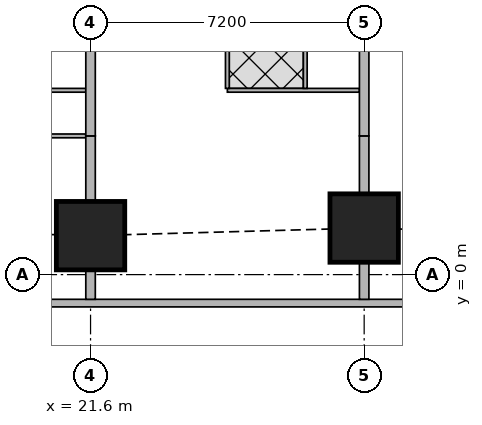
"""IFC4 building model, lengths in metres.
Left out: names, types, materials, properties, quantities, classifications, styles, units other than length and angle.
Written with IfcOpenShell. Run it as: python <this file> out.ifc"""

import sys

from ifc_helpers import new_model, si_unit, direction, frame, frame_2d, origin, origin_2d, place, context, subcontext, project, spatial, rectangle, extrude, element, fill, save


model = new_model("IFC4")
c1 = context("Model", 3, precision=1e-05, world=origin(), true_north=direction((0.0, 1.0)))
c2 = subcontext(c1, "Body", "Model", "MODEL_VIEW")
j1 = project(units=[si_unit("LENGTHUNIT", "METRE"), si_unit("PLANEANGLEUNIT", "RADIAN")], contexts=[c1])
p1 = place(None, origin())
s1 = spatial("IfcSite", under=j1, at=p1, CompositionType="ELEMENT")
p2 = place(p1, origin())
s2 = spatial("IfcBuilding", under=s1, at=p2, CompositionType="ELEMENT")
p3 = place(p2, frame((0.0, 0.0, 180.8)))
s3 = spatial("IfcBuildingStorey", under=s2, at=p3, CompositionType="ELEMENT", Elevation=180.8)
for number, where, z_axis, x_axis in (
    (1, (21.6, 1.025, 0.0), (0.0, 0.0, 1.0), (1.0, 0.0, 0.0)),
    (2, (28.8, 1.225, 0.0), (0.0, 0.0, 1.0), (1.0, 0.0, 0.0)),
):
    element("IfcColumn", number, at=place(p3, frame(where, z_axis=z_axis, x_axis=x_axis)), inside=s3, PredefinedType="COLUMN", context=c2, shape_type="SweptSolid", body=[
        extrude(rectangle(XDim=1.8, YDim=1.8, at=origin_2d()), origin(), (0.0, 0.0, 1.0), 3.75),
    ])
p4 = place(p3, frame((2.163, -0.75, 0.0), z_axis=(0.0, 0.0, 1.0), x_axis=(1.0, 0.0, 0.0)))
e3 = element("IfcWall", 3, at=p4, inside=s3, PredefinedType="SOLIDWALL", context=c2, shape_type="SweptSolid", body=[
    extrude(rectangle(XDim=45.628, YDim=0.2, at=frame_2d((22.814, 0.0))), origin(), (0.0, 0.0, 1.0), 3.5),
])
p5 = place(p4, frame((9.537, 0.0, 0.9)))
e4 = element("IfcOpeningElement", 4, at=p5, cuts=e3, PredefinedType="OPENING", context=c2, shape_type="SweptSolid", body=[
    extrude(rectangle(XDim=1.8, YDim=1.5, at=frame_2d((0.9, 0.75))), frame((0.0, 0.11, 0.0), z_axis=(0.0, -1.0, 0.0), x_axis=(1.0, 0.0, 0.0)), (0.0, 0.0, 1.0), 0.22),
])
p6 = place(p4, frame((13.137, 0.0, 0.9)))
e5 = element("IfcOpeningElement", 5, at=p6, cuts=e3, PredefinedType="OPENING", context=c2, shape_type="SweptSolid", body=[
    extrude(rectangle(XDim=1.8, YDim=1.5, at=frame_2d((0.9, 0.75))), frame((0.0, 0.11, 0.0), z_axis=(0.0, -1.0, 0.0), x_axis=(1.0, 0.0, 0.0)), (0.0, 0.0, 1.0), 0.22),
])
p7 = place(p4, frame((16.737, 0.0, 0.9)))
e6 = element("IfcOpeningElement", 6, at=p7, cuts=e3, PredefinedType="OPENING", context=c2, shape_type="SweptSolid", body=[
    extrude(rectangle(XDim=1.8, YDim=1.5, at=frame_2d((0.9, 0.75))), frame((0.0, 0.11, 0.0), z_axis=(0.0, -1.0, 0.0), x_axis=(1.0, 0.0, 0.0)), (0.0, 0.0, 1.0), 0.22),
])
p8 = place(p4, frame((20.337, 0.0, 0.9)))
e7 = element("IfcOpeningElement", 7, at=p8, cuts=e3, PredefinedType="OPENING", context=c2, shape_type="SweptSolid", body=[
    extrude(rectangle(XDim=1.8, YDim=1.5, at=frame_2d((0.9, 0.75))), frame((0.0, 0.11, 0.0), z_axis=(0.0, -1.0, 0.0), x_axis=(1.0, 0.0, 0.0)), (0.0, 0.0, 1.0), 0.22),
])
p9 = place(p4, frame((23.937, 0.0, 0.9)))
e8 = element("IfcOpeningElement", 8, at=p9, cuts=e3, PredefinedType="OPENING", context=c2, shape_type="SweptSolid", body=[
    extrude(rectangle(XDim=1.8, YDim=1.5, at=frame_2d((0.9, 0.75))), frame((0.0, 0.11, 0.0), z_axis=(0.0, -1.0, 0.0), x_axis=(1.0, 0.0, 0.0)), (0.0, 0.0, 1.0), 0.22),
])
p10 = place(p4, frame((27.537, 0.0, 0.9)))
e9 = element("IfcOpeningElement", 9, at=p10, cuts=e3, PredefinedType="OPENING", context=c2, shape_type="SweptSolid", body=[
    extrude(rectangle(XDim=1.8, YDim=1.5, at=frame_2d((0.9, 0.75))), frame((0.0, 0.11, 0.0), z_axis=(0.0, -1.0, 0.0), x_axis=(1.0, 0.0, 0.0)), (0.0, 0.0, 1.0), 0.22),
])
p11 = place(p4, frame((31.137, 0.0, 0.9)))
e10 = element("IfcOpeningElement", 10, at=p11, cuts=e3, PredefinedType="OPENING", context=c2, shape_type="SweptSolid", body=[
    extrude(rectangle(XDim=1.8, YDim=1.5, at=frame_2d((0.9, 0.75))), frame((0.0, 0.11, 0.0), z_axis=(0.0, -1.0, 0.0), x_axis=(1.0, 0.0, 0.0)), (0.0, 0.0, 1.0), 0.22),
])
p12 = place(p4, frame((34.737, 0.0, 0.9)))
e11 = element("IfcOpeningElement", 11, at=p12, cuts=e3, PredefinedType="OPENING", context=c2, shape_type="SweptSolid", body=[
    extrude(rectangle(XDim=1.8, YDim=1.5, at=frame_2d((0.9, 0.75))), frame((0.0, 0.11, 0.0), z_axis=(0.0, -1.0, 0.0), x_axis=(1.0, 0.0, 0.0)), (0.0, 0.0, 1.0), 0.22),
])
p13 = place(p3, frame((21.475, 3.65, 0.0), z_axis=(0.0, 0.0, 1.0), x_axis=(-1.0, 0.0, 0.0)))
e12 = element("IfcWall", 12, at=p13, inside=s3, PredefinedType="PARTITIONING", context=c2, shape_type="SweptSolid", body=[
    extrude(rectangle(XDim=7.075, YDim=0.1, at=frame_2d((3.538, 0.0))), origin(), (0.0, 0.0, 1.0), 3.5),
])
p14 = place(p13, frame((5.975, 0.0, 0.0)))
e13 = element("IfcOpeningElement", 13, at=p14, cuts=e12, PredefinedType="OPENING", context=c2, shape_type="SweptSolid", body=[
    extrude(rectangle(XDim=0.9, YDim=2.1, at=frame_2d((0.45, 1.05))), frame((0.0, 0.06, 0.0), z_axis=(0.0, -1.0, 0.0), x_axis=(1.0, 0.0, 0.0)), (0.0, 0.0, 1.0), 0.12),
])
p15 = place(p13, frame((2.375, 0.0, 0.0)))
e14 = element("IfcOpeningElement", 14, at=p15, cuts=e12, PredefinedType="OPENING", context=c2, shape_type="SweptSolid", body=[
    extrude(rectangle(XDim=0.9, YDim=2.1, at=frame_2d((0.45, 1.05))), frame((0.0, 0.06, 0.0), z_axis=(0.0, -1.0, 0.0), x_axis=(1.0, 0.0, 0.0)), (0.0, 0.0, 1.0), 0.12),
])
p16 = place(p3, frame((21.475, 4.85, 0.0), z_axis=(0.0, 0.0, 1.0), x_axis=(-1.0, 0.0, 0.0)))
e15 = element("IfcWall", 15, at=p16, inside=s3, PredefinedType="PARTITIONING", context=c2, shape_type="SweptSolid", body=[
    extrude(rectangle(XDim=7.075, YDim=0.1, at=frame_2d((3.538, 0.0))), origin(), (0.0, 0.0, 1.0), 3.5),
])
p17 = place(p16, frame((5.6, 0.0, 0.0)))
e16 = element("IfcOpeningElement", 16, at=p17, cuts=e15, PredefinedType="OPENING", context=c2, shape_type="SweptSolid", body=[
    extrude(rectangle(XDim=0.9, YDim=2.1, at=frame_2d((0.45, 1.05))), frame((0.0, 0.06, 0.0), z_axis=(0.0, -1.0, 0.0), x_axis=(1.0, 0.0, 0.0)), (0.0, 0.0, 1.0), 0.12),
])
p18 = place(p16, frame((2.225, 0.0, 0.0)))
e17 = element("IfcOpeningElement", 17, at=p18, cuts=e15, PredefinedType="OPENING", context=c2, shape_type="SweptSolid", body=[
    extrude(rectangle(XDim=0.9, YDim=2.1, at=frame_2d((0.45, 1.05))), frame((0.0, 0.06, 0.0), z_axis=(0.0, -1.0, 0.0), x_axis=(1.0, 0.0, 0.0)), (0.0, 0.0, 1.0), 0.12),
])
p19 = place(p16, frame((3.8, 0.0, 0.0)))
e18 = element("IfcOpeningElement", 18, at=p19, cuts=e15, PredefinedType="OPENING", context=c2, shape_type="SweptSolid", body=[
    extrude(rectangle(XDim=0.9, YDim=2.1, at=frame_2d((0.45, 1.05))), frame((0.0, 0.06, 0.0), z_axis=(0.0, -1.0, 0.0), x_axis=(1.0, 0.0, 0.0)), (0.0, 0.0, 1.0), 0.12),
])
p20 = place(p16, frame((0.425, 0.0, 0.0)))
e19 = element("IfcOpeningElement", 19, at=p20, cuts=e15, PredefinedType="OPENING", context=c2, shape_type="SweptSolid", body=[
    extrude(rectangle(XDim=0.9, YDim=2.1, at=frame_2d((0.45, 1.05))), frame((0.0, 0.06, 0.0), z_axis=(0.0, -1.0, 0.0), x_axis=(1.0, 0.0, 0.0)), (0.0, 0.0, 1.0), 0.12),
])
p21 = place(p3, frame((28.675, 4.85, 0.0), z_axis=(0.0, 0.0, 1.0), x_axis=(-1.0, 0.0, 0.0)))
e20 = element("IfcWall", 20, at=p21, inside=s3, PredefinedType="PARTITIONING", context=c2, shape_type="SweptSolid", body=[
    extrude(rectangle(XDim=3.475, YDim=0.1, at=frame_2d((1.738, 0.0))), origin(), (0.0, 0.0, 1.0), 3.5),
])
p22 = place(p21, frame((2.0, 0.0, 0.0)))
e21 = element("IfcOpeningElement", 21, at=p22, cuts=e20, PredefinedType="OPENING", context=c2, shape_type="SweptSolid", body=[
    extrude(rectangle(XDim=0.9, YDim=2.1, at=frame_2d((0.45, 1.05))), frame((0.0, 0.06, 0.0), z_axis=(0.0, -1.0, 0.0), x_axis=(1.0, 0.0, 0.0)), (0.0, 0.0, 1.0), 0.12),
])
p23 = place(p21, frame((0.2, 0.0, 0.0)))
e22 = element("IfcOpeningElement", 22, at=p23, cuts=e20, PredefinedType="OPENING", context=c2, shape_type="SweptSolid", body=[
    extrude(rectangle(XDim=0.9, YDim=2.1, at=frame_2d((0.45, 1.05))), frame((0.0, 0.06, 0.0), z_axis=(0.0, -1.0, 0.0), x_axis=(1.0, 0.0, 0.0)), (0.0, 0.0, 1.0), 0.12),
])
for number, where, z_axis, x_axis in (
    (23, (25.2, 4.9, 0.0), (0.0, 0.0, 1.0), (0.0, 1.0, 0.0)),
    (24, (27.25, 4.9, 0.0), (0.0, 0.0, 1.0), (0.0, 1.0, 0.0)),
):
    element("IfcWall", number, at=place(p3, frame(where, z_axis=z_axis, x_axis=x_axis)), inside=s3, PredefinedType="PARTITIONING", context=c2, shape_type="SweptSolid", body=[
        extrude(rectangle(XDim=3.525, YDim=0.1, at=frame_2d((1.763, 0.0))), origin(), (0.0, 0.0, 1.0), 3.5),
    ])
p24 = place(p3, frame((21.6, -0.65, 0.0), z_axis=(0.0, 0.0, 1.0), x_axis=(0.0, 1.0, 0.0)))
e25 = element("IfcWall", 25, at=p24, inside=s3, PredefinedType="SOLIDWALL", context=c2, shape_type="SweptSolid", body=[
    extrude(rectangle(XDim=0.774, YDim=0.25, at=frame_2d((0.387, 0.0))), origin(), (0.0, 0.0, 1.0), 2.1),
])
p25 = place(p3, frame((21.6, 1.926, 0.0), z_axis=(0.0, 0.0, 1.0), x_axis=(0.0, 1.0, 0.0)))
e26 = element("IfcWall", 26, at=p25, inside=s3, PredefinedType="SOLIDWALL", context=c2, shape_type="SweptSolid", body=[
    extrude(rectangle(XDim=1.724, YDim=0.25, at=frame_2d((0.862, 0.0))), origin(), (0.0, 0.0, 1.0), 2.1),
])
p26 = place(p3, frame((21.6, 3.65, 0.0), z_axis=(0.0, 0.0, 1.0), x_axis=(0.0, 1.0, 0.0)))
e27 = element("IfcWall", 27, at=p26, inside=s3, PredefinedType="SOLIDWALL", context=c2, shape_type="SweptSolid", body=[
    extrude(rectangle(XDim=3.099, YDim=0.25, at=frame_2d((1.55, 0.0))), origin(), (0.0, 0.0, 1.0), 3.5),
])
p27 = place(p3, frame((28.8, -0.65, 0.0), z_axis=(0.0, 0.0, 1.0), x_axis=(0.0, 1.0, 0.0)))
e28 = element("IfcWall", 28, at=p27, inside=s3, PredefinedType="SOLIDWALL", context=c2, shape_type="SweptSolid", body=[
    extrude(rectangle(XDim=0.974, YDim=0.25, at=frame_2d((0.487, 0.0))), origin(), (0.0, 0.0, 1.0), 2.1),
])
p28 = place(p3, frame((28.8, 2.126, 0.0), z_axis=(0.0, 0.0, 1.0), x_axis=(0.0, 1.0, 0.0)))
e29 = element("IfcWall", 29, at=p28, inside=s3, PredefinedType="SOLIDWALL", context=c2, shape_type="SweptSolid", body=[
    extrude(rectangle(XDim=1.524, YDim=0.25, at=frame_2d((0.762, 0.0))), origin(), (0.0, 0.0, 1.0), 2.1),
])
p29 = place(p3, frame((28.8, 3.65, 0.0), z_axis=(0.0, 0.0, 1.0), x_axis=(0.0, 1.0, 0.0)))
e30 = element("IfcWall", 30, at=p29, inside=s3, PredefinedType="SOLIDWALL", context=c2, shape_type="SweptSolid", body=[
    extrude(rectangle(XDim=3.099, YDim=0.25, at=frame_2d((1.55, 0.0))), origin(), (0.0, 0.0, 1.0), 3.5),
])
p30 = place(p7, origin())
e31 = element("IfcWindow", 31, at=p30, inside=s3, PartitioningType="SINGLE_PANEL", PredefinedType="WINDOW", context=c2, shape_type="SweptSolid", body=[
    extrude(rectangle(XDim=1.8, YDim=1.5, at=frame_2d((0.9, 0.75))), frame((0.0, 0.03, 0.0), z_axis=(0.0, -1.0, 0.0), x_axis=(1.0, 0.0, 0.0)), (0.0, 0.0, 1.0), 0.06),
])
fill(e6, e31)
p31 = place(p8, origin())
e32 = element("IfcWindow", 32, at=p31, inside=s3, PartitioningType="SINGLE_PANEL", PredefinedType="WINDOW", context=c2, shape_type="SweptSolid", body=[
    extrude(rectangle(XDim=1.8, YDim=1.5, at=frame_2d((0.9, 0.75))), frame((0.0, 0.03, 0.0), z_axis=(0.0, -1.0, 0.0), x_axis=(1.0, 0.0, 0.0)), (0.0, 0.0, 1.0), 0.06),
])
fill(e7, e32)
p32 = place(p9, origin())
e33 = element("IfcWindow", 33, at=p32, inside=s3, PartitioningType="SINGLE_PANEL", PredefinedType="WINDOW", context=c2, shape_type="SweptSolid", body=[
    extrude(rectangle(XDim=1.8, YDim=1.5, at=frame_2d((0.9, 0.75))), frame((0.0, 0.03, 0.0), z_axis=(0.0, -1.0, 0.0), x_axis=(1.0, 0.0, 0.0)), (0.0, 0.0, 1.0), 0.06),
])
fill(e8, e33)
p33 = place(p10, origin())
e34 = element("IfcWindow", 34, at=p33, inside=s3, PartitioningType="SINGLE_PANEL", PredefinedType="WINDOW", context=c2, shape_type="SweptSolid", body=[
    extrude(rectangle(XDim=1.8, YDim=1.5, at=frame_2d((0.9, 0.75))), frame((0.0, 0.03, 0.0), z_axis=(0.0, -1.0, 0.0), x_axis=(1.0, 0.0, 0.0)), (0.0, 0.0, 1.0), 0.06),
])
fill(e9, e34)
p34 = place(p20, origin())
e35 = element("IfcDoor", 35, at=p34, inside=s3, OperationType="SINGLE_SWING_RIGHT", PredefinedType="DOOR", context=c2, shape_type="SweptSolid", body=[
    extrude(rectangle(XDim=0.9, YDim=2.1, at=frame_2d((0.45, 1.05))), frame((0.0, 0.025, 0.0), z_axis=(0.0, -1.0, 0.0), x_axis=(1.0, 0.0, 0.0)), (0.0, 0.0, 1.0), 0.05),
])
fill(e19, e35)
p35 = place(p22, origin())
e36 = element("IfcDoor", 36, at=p35, inside=s3, OperationType="SINGLE_SWING_LEFT", PredefinedType="DOOR", context=c2, shape_type="SweptSolid", body=[
    extrude(rectangle(XDim=0.9, YDim=2.1, at=frame_2d((0.45, 1.05))), frame((0.0, 0.025, 0.0), z_axis=(0.0, -1.0, 0.0), x_axis=(1.0, 0.0, 0.0)), (0.0, 0.0, 1.0), 0.05),
])
fill(e21, e36)
p36 = place(p23, origin())
e37 = element("IfcDoor", 37, at=p36, inside=s3, OperationType="SINGLE_SWING_RIGHT", PredefinedType="DOOR", context=c2, shape_type="SweptSolid", body=[
    extrude(rectangle(XDim=0.9, YDim=2.1, at=frame_2d((0.45, 1.05))), frame((0.0, 0.025, 0.0), z_axis=(0.0, -1.0, 0.0), x_axis=(1.0, 0.0, 0.0)), (0.0, 0.0, 1.0), 0.05),
])
fill(e22, e37)
save(model, sys.argv[1])
